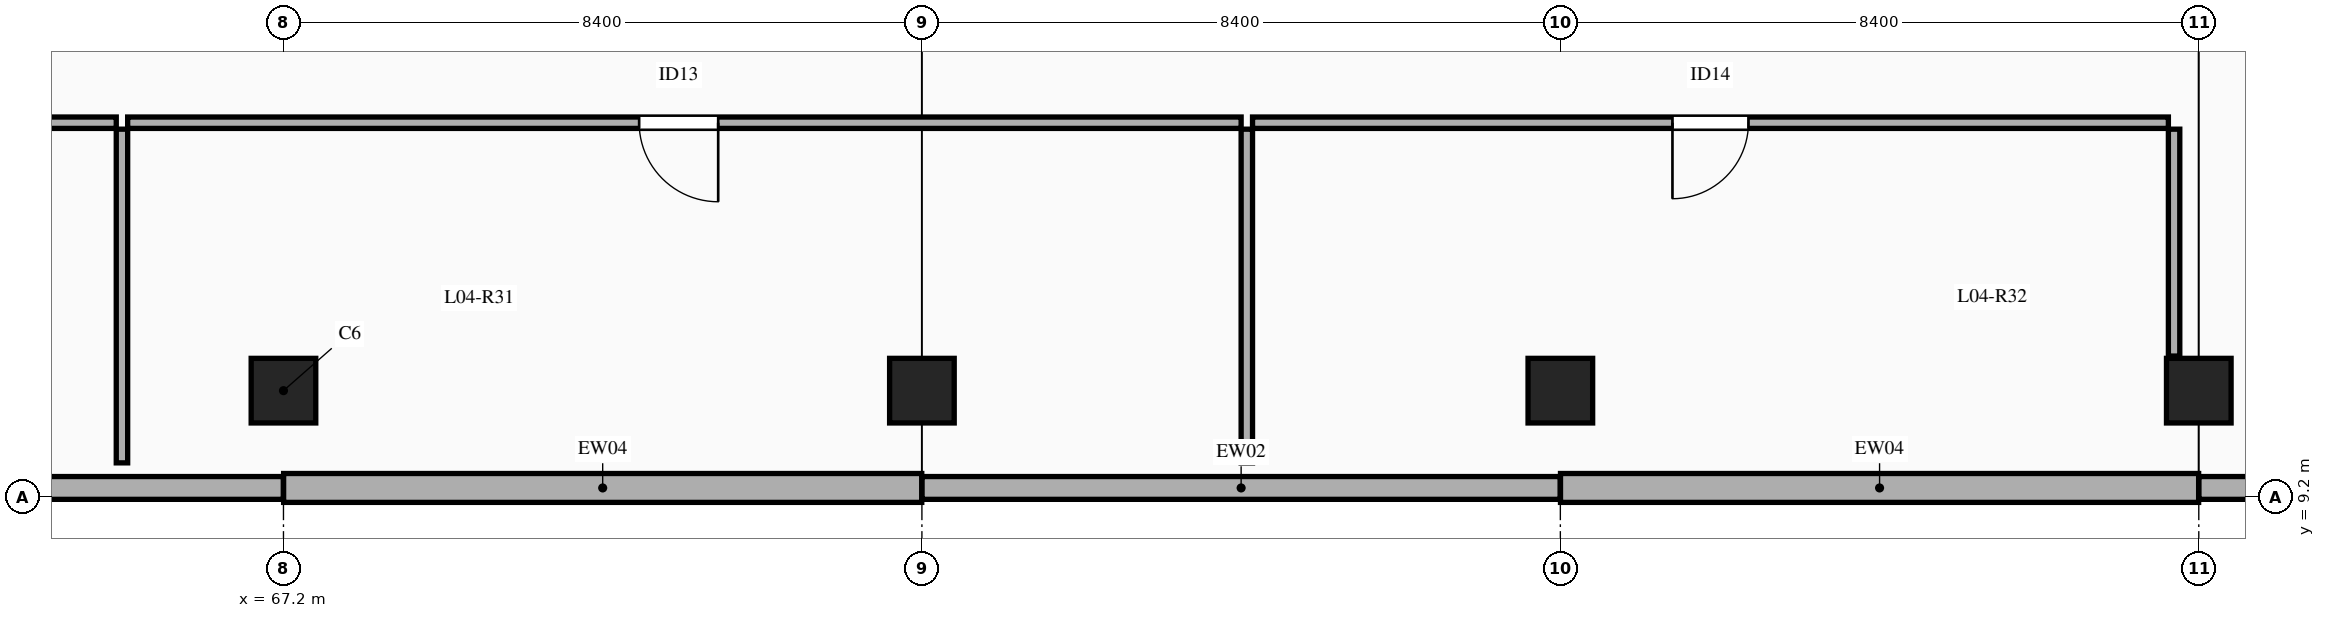
"""IFC4 building model, lengths in metres.
Left out: names, types, materials, properties, quantities, classifications, styles, units other than length and angle.
Written with IfcOpenShell. Run it as: python <this file> out.ifc"""

import sys

from ifc_helpers import new_model, si_unit, direction, frame, frame_2d, origin, origin_2d, place, context, subcontext, project, spatial, rectangle, extrude, element, fill, save


model = new_model("IFC4")
c1 = context("Model", 3, precision=1e-05, world=origin(), true_north=direction((0.0, 1.0)))
c2 = subcontext(c1, "Body", "Model", "MODEL_VIEW")
j1 = project(units=[si_unit("LENGTHUNIT", "METRE"), si_unit("PLANEANGLEUNIT", "RADIAN")], contexts=[c1])
p1 = place(None, origin())
s1 = spatial("IfcSite", under=j1, at=p1, CompositionType="ELEMENT")
p2 = place(p1, origin())
s2 = spatial("IfcBuilding", under=s1, at=p2, CompositionType="ELEMENT")
p3 = place(p2, frame((0.0, 0.0, 19.5)))
s3 = spatial("IfcBuildingStorey", under=s2, at=p3, CompositionType="ELEMENT", Elevation=19.5)
for number, where, z_axis, x_axis in (
    (1, (67.2, 10.6, 0.0), (0.0, 0.0, 1.0), (1.0, 0.0, 0.0)),
    (2, (75.6, 10.6, 0.0), (0.0, 0.0, 1.0), (1.0, 0.0, 0.0)),
    (3, (84.0, 10.6, 0.0), (0.0, 0.0, 1.0), (1.0, 0.0, 0.0)),
    (4, (92.4, 10.6, 0.0), (0.0, 0.0, 1.0), (1.0, 0.0, 0.0)),
):
    element("IfcColumn", number, at=place(p3, frame(where, z_axis=z_axis, x_axis=x_axis)), inside=s3, PredefinedType="COLUMN", context=c2, shape_type="SweptSolid", body=[
        extrude(rectangle(XDim=0.85, YDim=0.85, at=origin_2d()), origin(), (0.0, 0.0, 1.0), 4.5),
    ])
p4 = place(p3, frame((58.802, 9.32, 0.0), z_axis=(0.0, 0.0, 1.0), x_axis=(1.0, 0.0, 0.0)))
e5 = element("IfcWall", 5, at=p4, inside=s3, PredefinedType="SOLIDWALL", context=c2, shape_type="SweptSolid", body=[
    extrude(rectangle(XDim=8.396, YDim=0.3, at=frame_2d((4.198, 0.0))), origin(), (0.0, 0.0, 1.0), 3.55),
])
p5 = place(p3, frame((67.202, 9.32, 0.0), z_axis=(0.0, 0.0, 1.0), x_axis=(1.0, 0.0, 0.0)))
e6 = element("IfcWall", 6, at=p5, inside=s3, PredefinedType="SOLIDWALL", context=c2, shape_type="SweptSolid", body=[
    extrude(rectangle(XDim=8.396, YDim=0.38, at=frame_2d((4.198, 0.0))), origin(), (0.0, 0.0, 1.0), 3.55),
])
p6 = place(p3, frame((75.602, 9.32, 0.0), z_axis=(0.0, 0.0, 1.0), x_axis=(1.0, 0.0, 0.0)))
e7 = element("IfcWall", 7, at=p6, inside=s3, PredefinedType="SOLIDWALL", context=c2, shape_type="SweptSolid", body=[
    extrude(rectangle(XDim=8.396, YDim=0.3, at=frame_2d((4.198, 0.0))), origin(), (0.0, 0.0, 1.0), 3.55),
])
p7 = place(p3, frame((84.002, 9.32, 0.0), z_axis=(0.0, 0.0, 1.0), x_axis=(1.0, 0.0, 0.0)))
e8 = element("IfcWall", 8, at=p7, inside=s3, PredefinedType="SOLIDWALL", context=c2, shape_type="SweptSolid", body=[
    extrude(rectangle(XDim=8.396, YDim=0.38, at=frame_2d((4.198, 0.0))), origin(), (0.0, 0.0, 1.0), 3.55),
])
p8 = place(p3, frame((92.402, 9.32, 0.0), z_axis=(0.0, 0.0, 1.0), x_axis=(1.0, 0.0, 0.0)))
e9 = element("IfcWall", 9, at=p8, inside=s3, PredefinedType="SOLIDWALL", context=c2, shape_type="SweptSolid", body=[
    extrude(rectangle(XDim=8.396, YDim=0.3, at=frame_2d((4.198, 0.0))), origin(), (0.0, 0.0, 1.0), 3.55),
])
p9 = place(p3, frame((58.16, 14.125, 0.0), z_axis=(0.0, 0.0, 1.0), x_axis=(1.0, 0.0, 0.0)))
e10 = element("IfcWall", 10, at=p9, inside=s3, PredefinedType="PARTITIONING", context=c2, shape_type="SweptSolid", body=[
    extrude(rectangle(XDim=6.84, YDim=0.15, at=frame_2d((3.42, 0.0))), origin(), (0.0, 0.0, 1.0), 3.45),
])
p10 = place(p9, frame((2.92, 0.0, 0.0)))
e11 = element("IfcOpeningElement", 11, at=p10, cuts=e10, PredefinedType="OPENING", context=c2, shape_type="SweptSolid", body=[
    extrude(rectangle(XDim=1.0, YDim=2.15, at=frame_2d((0.5, 1.075))), frame((0.0, 0.085, 0.0), z_axis=(0.0, -1.0, 0.0), x_axis=(1.0, 0.0, 0.0)), (0.0, 0.0, 1.0), 0.17),
])
p11 = place(p3, frame((65.15, 14.125, 0.0), z_axis=(0.0, 0.0, 1.0), x_axis=(1.0, 0.0, 0.0)))
e12 = element("IfcWall", 12, at=p11, inside=s3, PredefinedType="PARTITIONING", context=c2, shape_type="SweptSolid", body=[
    extrude(rectangle(XDim=14.65, YDim=0.15, at=frame_2d((7.325, 0.0))), origin(), (0.0, 0.0, 1.0), 3.45),
])
p12 = place(p11, frame((6.73, 0.0, 0.0)))
e13 = element("IfcOpeningElement", 13, at=p12, cuts=e12, PredefinedType="OPENING", context=c2, shape_type="SweptSolid", body=[
    extrude(rectangle(XDim=1.04, YDim=2.15, at=frame_2d((0.52, 1.075))), frame((0.0, 0.085, 0.0), z_axis=(0.0, -1.0, 0.0), x_axis=(1.0, 0.0, 0.0)), (0.0, 0.0, 1.0), 0.17),
])
p13 = place(p3, frame((79.95, 14.125, 0.0), z_axis=(0.0, 0.0, 1.0), x_axis=(1.0, 0.0, 0.0)))
e14 = element("IfcWall", 14, at=p13, inside=s3, PredefinedType="PARTITIONING", context=c2, shape_type="SweptSolid", body=[
    extrude(rectangle(XDim=12.05, YDim=0.15, at=frame_2d((6.025, 0.0))), origin(), (0.0, 0.0, 1.0), 3.45),
])
p14 = place(p13, frame((5.525, 0.0, 0.0)))
e15 = element("IfcOpeningElement", 15, at=p14, cuts=e14, PredefinedType="OPENING", context=c2, shape_type="SweptSolid", body=[
    extrude(rectangle(XDim=1.0, YDim=2.15, at=frame_2d((0.5, 1.075))), frame((0.0, 0.085, 0.0), z_axis=(0.0, -1.0, 0.0), x_axis=(1.0, 0.0, 0.0)), (0.0, 0.0, 1.0), 0.17),
])
for number, where, z_axis, x_axis in (
    (16, (65.075, 9.65, 0.0), (0.0, 0.0, 1.0), (0.0, 1.0, 0.0)),
    (17, (79.875, 9.65, 0.0), (0.0, 0.0, 1.0), (0.0, 1.0, 0.0)),
):
    element("IfcWall", number, at=place(p3, frame(where, z_axis=z_axis, x_axis=x_axis)), inside=s3, PredefinedType="PARTITIONING", context=c2, shape_type="SweptSolid", body=[
        extrude(rectangle(XDim=4.39, YDim=0.15, at=frame_2d((2.195, 0.0))), origin(), (0.0, 0.0, 1.0), 3.45),
    ])
p15 = place(p3, frame((92.075, 11.055, 0.0), z_axis=(0.0, 0.0, 1.0), x_axis=(0.0, 1.0, 0.0)))
e18 = element("IfcWall", 18, at=p15, inside=s3, PredefinedType="PARTITIONING", context=c2, shape_type="SweptSolid", body=[
    extrude(rectangle(XDim=2.985, YDim=0.15, at=frame_2d((1.493, 0.0))), origin(), (0.0, 0.0, 1.0), 3.45),
])
p16 = place(p12, frame((1.04, 0.0, 0.0), z_axis=(0.0, 0.0, 1.0), x_axis=(-1.0, 0.0, 0.0)))
e19 = element("IfcDoor", 19, at=p16, inside=s3, OperationType="SINGLE_SWING_LEFT", PredefinedType="DOOR", context=c2, shape_type="SweptSolid", body=[
    extrude(rectangle(XDim=1.04, YDim=2.15, at=frame_2d((0.52, 1.075))), frame((0.0, 0.025, 0.0), z_axis=(0.0, -1.0, 0.0), x_axis=(1.0, 0.0, 0.0)), (0.0, 0.0, 1.0), 0.05),
])
fill(e13, e19)
p17 = place(p14, frame((1.0, 0.0, 0.0), z_axis=(0.0, 0.0, 1.0), x_axis=(-1.0, 0.0, 0.0)))
e20 = element("IfcDoor", 20, at=p17, inside=s3, OperationType="SINGLE_SWING_RIGHT", PredefinedType="DOOR", context=c2, shape_type="SweptSolid", body=[
    extrude(rectangle(XDim=1.0, YDim=2.15, at=frame_2d((0.5, 1.075))), frame((0.0, 0.025, 0.0), z_axis=(0.0, -1.0, 0.0), x_axis=(1.0, 0.0, 0.0)), (0.0, 0.0, 1.0), 0.05),
])
fill(e15, e20)
save(model, sys.argv[1])
